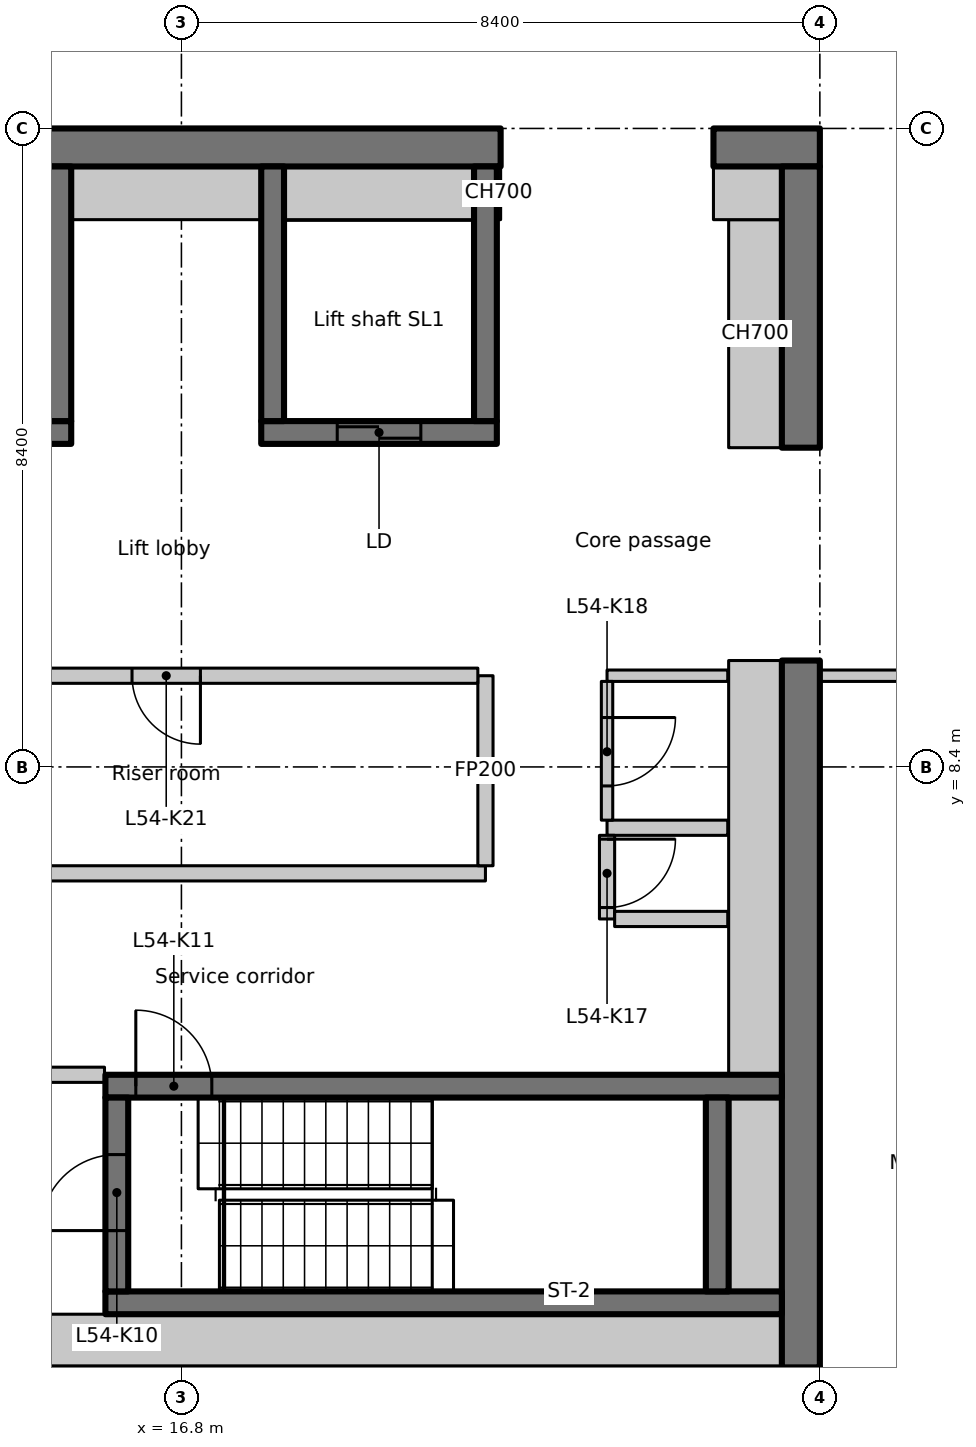
"""IFC4 building model, lengths in metres.
Left out: names, types, materials, properties, quantities, classifications, styles, units other than length and angle.
Written with IfcOpenShell. Run it as: python <this file> out.ifc"""

import sys

from ifc_helpers import new_model, si_unit, direction, frame, frame_2d, origin, place, context, subcontext, project, spatial, rectangle, extrude, element, fill, save


model = new_model("IFC4")
c1 = context("Model", 3, precision=1e-05, world=origin(), true_north=direction((0.0, 1.0)))
c2 = subcontext(c1, "Body", "Model", "MODEL_VIEW")
j1 = project(units=[si_unit("LENGTHUNIT", "METRE"), si_unit("PLANEANGLEUNIT", "RADIAN")], contexts=[c1])
p1 = place(None, origin())
s1 = spatial("IfcSite", under=j1, at=p1, CompositionType="ELEMENT")
p2 = place(p1, origin())
s2 = spatial("IfcBuilding", under=s1, at=p2, CompositionType="ELEMENT")
p3 = place(p2, frame((0.0, 0.0, 215.7)))
s3 = spatial("IfcBuildingStorey", under=s2, at=p3, CompositionType="ELEMENT", Elevation=215.7)
p4 = place(p3, frame((-1.1, 16.55, 0.0), z_axis=(0.0, 0.0, 1.0), x_axis=(1.0, 0.0, 0.0)))
e1 = element("IfcWall", 1, at=p4, inside=s3, PredefinedType="SHEAR", context=c2, shape_type="SweptSolid", body=[
    extrude(rectangle(XDim=22.1, YDim=0.5, at=frame_2d((11.05, 0.0))), origin(), (0.0, 0.0, 1.0), 3.35),
])
p5 = place(p4, frame((3.15, 0.0, 0.0)))
e2 = element("IfcOpeningElement", 2, at=p5, cuts=e1, PredefinedType="OPENING", context=c2, shape_type="SweptSolid", body=[
    extrude(rectangle(XDim=1.1, YDim=2.3, at=frame_2d((0.55, 1.15))), frame((0.0, 0.26, 0.0), z_axis=(0.0, -1.0, 0.0), x_axis=(1.0, 0.0, 0.0)), (0.0, 0.0, 1.0), 0.52),
])
p6 = place(p3, frame((23.8, 16.55, 0.0), z_axis=(0.0, 0.0, 1.0), x_axis=(1.0, 0.0, 0.0)))
e3 = element("IfcWall", 3, at=p6, inside=s3, PredefinedType="SHEAR", context=c2, shape_type="SweptSolid", body=[
    extrude(rectangle(XDim=1.4, YDim=0.5, at=frame_2d((0.7, 0.0))), origin(), (0.0, 0.0, 1.0), 3.35),
])
p7 = place(p3, frame((24.95, 0.5, 0.0), z_axis=(0.0, 0.0, 1.0), x_axis=(0.0, 1.0, 0.0)))
e4 = element("IfcWall", 4, at=p7, inside=s3, PredefinedType="SHEAR", context=c2, shape_type="SweptSolid", body=[
    extrude(rectangle(XDim=9.3, YDim=0.5, at=frame_2d((4.65, 0.0))), origin(), (0.0, 0.0, 1.0), 3.35),
])
p8 = place(p3, frame((24.95, 12.6, 0.0), z_axis=(0.0, 0.0, 1.0), x_axis=(0.0, 1.0, 0.0)))
e5 = element("IfcWall", 5, at=p8, inside=s3, PredefinedType="SHEAR", context=c2, shape_type="SweptSolid", body=[
    extrude(rectangle(XDim=3.7, YDim=0.5, at=frame_2d((1.85, 0.0))), origin(), (0.0, 0.0, 1.0), 3.35),
])
p9 = place(p3, frame((24.35, 12.6, 0.0), z_axis=(0.0, 0.0, 1.0), x_axis=(0.0, 1.0, 0.0)))
e6 = element("IfcWall", 6, at=p9, inside=s3, PredefinedType="PARTITIONING", context=c2, shape_type="SweptSolid", body=[
    extrude(rectangle(XDim=3.0, YDim=0.7, at=frame_2d((1.5, 0.0))), origin(), (0.0, 0.0, 1.0), 3.35),
])
p10 = place(p3, frame((23.8, 15.95, 0.0), z_axis=(0.0, 0.0, 1.0), x_axis=(1.0, 0.0, 0.0)))
e7 = element("IfcWall", 7, at=p10, inside=s3, PredefinedType="PARTITIONING", context=c2, shape_type="SweptSolid", body=[
    extrude(rectangle(XDim=0.9, YDim=0.7, at=frame_2d((0.45, 0.0))), origin(), (0.0, 0.0, 1.0), 3.35),
])
p11 = place(p3, frame((0.5, 12.8, 0.0), z_axis=(0.0, 0.0, 1.0), x_axis=(1.0, 0.0, 0.0)))
e8 = element("IfcWall", 8, at=p11, inside=s3, PredefinedType="SHEAR", context=c2, shape_type="SweptSolid", body=[
    extrude(rectangle(XDim=14.85, YDim=0.3, at=frame_2d((7.425, 0.0))), origin(), (0.0, 0.0, 1.0), 3.35),
])
p12 = place(p11, frame((4.35, 0.0, 0.0)))
e9 = element("IfcOpeningElement", 9, at=p12, cuts=e8, PredefinedType="OPENING", context=c2, shape_type="SweptSolid", body=[
    extrude(rectangle(XDim=1.1, YDim=2.3, at=frame_2d((0.55, 1.15))), frame((0.0, 0.16, 0.0), z_axis=(0.0, -1.0, 0.0), x_axis=(1.0, 0.0, 0.0)), (0.0, 0.0, 1.0), 0.32),
])
p13 = place(p11, frame((7.15, 0.0, 0.0)))
e10 = element("IfcOpeningElement", 10, at=p13, cuts=e8, PredefinedType="OPENING", context=c2, shape_type="SweptSolid", body=[
    extrude(rectangle(XDim=1.1, YDim=2.3, at=frame_2d((0.55, 1.15))), frame((0.0, 0.16, 0.0), z_axis=(0.0, -1.0, 0.0), x_axis=(1.0, 0.0, 0.0)), (0.0, 0.0, 1.0), 0.32),
])
p14 = place(p11, frame((9.95, 0.0, 0.0)))
e11 = element("IfcOpeningElement", 11, at=p14, cuts=e8, PredefinedType="OPENING", context=c2, shape_type="SweptSolid", body=[
    extrude(rectangle(XDim=1.1, YDim=2.3, at=frame_2d((0.55, 1.15))), frame((0.0, 0.16, 0.0), z_axis=(0.0, -1.0, 0.0), x_axis=(1.0, 0.0, 0.0)), (0.0, 0.0, 1.0), 0.32),
])
p15 = place(p11, frame((12.75, 0.0, 0.0)))
e12 = element("IfcOpeningElement", 12, at=p15, cuts=e8, PredefinedType="OPENING", context=c2, shape_type="SweptSolid", body=[
    extrude(rectangle(XDim=1.1, YDim=2.3, at=frame_2d((0.55, 1.15))), frame((0.0, 0.16, 0.0), z_axis=(0.0, -1.0, 0.0), x_axis=(1.0, 0.0, 0.0)), (0.0, 0.0, 1.0), 0.32),
])
p16 = place(p3, frame((15.2, 12.95, 0.0), z_axis=(0.0, 0.0, 1.0), x_axis=(0.0, 1.0, 0.0)))
e13 = element("IfcWall", 13, at=p16, inside=s3, PredefinedType="SHEAR", context=c2, shape_type="SweptSolid", body=[
    extrude(rectangle(XDim=3.35, YDim=0.3, at=frame_2d((1.675, 0.0))), origin(), (0.0, 0.0, 1.0), 3.35),
])
p17 = place(p3, frame((17.85, 12.8, 0.0), z_axis=(0.0, 0.0, 1.0), x_axis=(1.0, 0.0, 0.0)))
e14 = element("IfcWall", 14, at=p17, inside=s3, PredefinedType="SHEAR", context=c2, shape_type="SweptSolid", body=[
    extrude(rectangle(XDim=3.1, YDim=0.3, at=frame_2d((1.55, 0.0))), origin(), (0.0, 0.0, 1.0), 3.35),
])
p18 = place(p17, frame((1.0, 0.0, 0.0)))
e15 = element("IfcOpeningElement", 15, at=p18, cuts=e14, PredefinedType="OPENING", context=c2, shape_type="SweptSolid", body=[
    extrude(rectangle(XDim=1.1, YDim=2.3, at=frame_2d((0.55, 1.15))), frame((0.0, 0.16, 0.0), z_axis=(0.0, -1.0, 0.0), x_axis=(1.0, 0.0, 0.0)), (0.0, 0.0, 1.0), 0.32),
])
for number, where, z_axis, x_axis in (
    (16, (18.0, 12.95, 0.0), (0.0, 0.0, 1.0), (0.0, 1.0, 0.0)),
    (17, (20.8, 12.95, 0.0), (0.0, 0.0, 1.0), (0.0, 1.0, 0.0)),
):
    element("IfcWall", number, at=place(p3, frame(where, z_axis=z_axis, x_axis=x_axis)), inside=s3, PredefinedType="SHEAR", context=c2, shape_type="SweptSolid", body=[
        extrude(rectangle(XDim=3.35, YDim=0.3, at=frame_2d((1.675, 0.0))), origin(), (0.0, 0.0, 1.0), 3.35),
    ])
p19 = place(p3, frame((15.8, 1.35, 0.0), z_axis=(0.0, 0.0, 1.0), x_axis=(1.0, 0.0, 0.0)))
e18 = element("IfcWall", 18, at=p19, inside=s3, PredefinedType="SHEAR", context=c2, shape_type="SweptSolid", body=[
    extrude(rectangle(XDim=8.9, YDim=0.3, at=frame_2d((4.45, 0.0))), origin(), (0.0, 0.0, 1.0), 3.35),
])
p20 = place(p3, frame((15.8, 4.2, 0.0), z_axis=(0.0, 0.0, 1.0), x_axis=(1.0, 0.0, 0.0)))
e19 = element("IfcWall", 19, at=p20, inside=s3, PredefinedType="SHEAR", context=c2, shape_type="SweptSolid", body=[
    extrude(rectangle(XDim=8.9, YDim=0.3, at=frame_2d((4.45, 0.0))), origin(), (0.0, 0.0, 1.0), 3.35),
])
p21 = place(p20, frame((0.4, 0.0, 0.0)))
e20 = element("IfcOpeningElement", 20, at=p21, cuts=e19, PredefinedType="OPENING", context=c2, shape_type="SweptSolid", body=[
    extrude(rectangle(XDim=1.0, YDim=2.1, at=frame_2d((0.5, 1.05))), frame((0.0, 0.16, 0.0), z_axis=(0.0, -1.0, 0.0), x_axis=(1.0, 0.0, 0.0)), (0.0, 0.0, 1.0), 0.32),
])
p22 = place(p3, frame((15.95, 1.5, 0.0), z_axis=(0.0, 0.0, 1.0), x_axis=(0.0, 1.0, 0.0)))
e21 = element("IfcWall", 21, at=p22, inside=s3, PredefinedType="SHEAR", context=c2, shape_type="SweptSolid", body=[
    extrude(rectangle(XDim=2.55, YDim=0.3, at=frame_2d((1.275, 0.0))), origin(), (0.0, 0.0, 1.0), 3.35),
])
p23 = place(p22, frame((0.8, 0.0, 0.0)))
e22 = element("IfcOpeningElement", 22, at=p23, cuts=e21, PredefinedType="OPENING", context=c2, shape_type="SweptSolid", body=[
    extrude(rectangle(XDim=1.0, YDim=2.1, at=frame_2d((0.5, 1.05))), frame((0.0, 0.16, 0.0), z_axis=(0.0, -1.0, 0.0), x_axis=(1.0, 0.0, 0.0)), (0.0, 0.0, 1.0), 0.32),
])
p24 = place(p3, frame((23.85, 1.5, 0.0), z_axis=(0.0, 0.0, 1.0), x_axis=(0.0, 1.0, 0.0)))
e23 = element("IfcWall", 23, at=p24, inside=s3, PredefinedType="SHEAR", context=c2, shape_type="SweptSolid", body=[
    extrude(rectangle(XDim=2.55, YDim=0.3, at=frame_2d((1.275, 0.0))), origin(), (0.0, 0.0, 1.0), 3.35),
])
p25 = place(p3, frame((13.362, 4.35, 0.0), z_axis=(0.0, 0.0, 1.0), x_axis=(1.0, 0.0, 0.0)))
e24 = element("IfcWall", 24, at=p25, inside=s3, PredefinedType="PARTITIONING", context=c2, shape_type="SweptSolid", body=[
    extrude(rectangle(XDim=2.426, YDim=0.2, at=frame_2d((1.213, 0.0))), origin(), (0.0, 0.0, 1.0), 3.35),
])
p26 = place(p25, frame((0.638, 0.0, 0.0)))
e25 = element("IfcOpeningElement", 25, at=p26, cuts=e24, PredefinedType="OPENING", context=c2, shape_type="SweptSolid", body=[
    extrude(rectangle(XDim=1.0, YDim=2.1, at=frame_2d((0.5, 1.05))), frame((0.0, 0.11, 0.0), z_axis=(0.0, -1.0, 0.0), x_axis=(1.0, 0.0, 0.0)), (0.0, 0.0, 1.0), 0.22),
])
p27 = place(p3, frame((12.4, 7.0, 0.0), z_axis=(0.0, 0.0, 1.0), x_axis=(1.0, 0.0, 0.0)))
e26 = element("IfcWall", 26, at=p27, inside=s3, PredefinedType="PARTITIONING", context=c2, shape_type="SweptSolid", body=[
    extrude(rectangle(XDim=8.4, YDim=0.2, at=frame_2d((4.2, 0.0))), origin(), (0.0, 0.0, 1.0), 3.35),
])
p28 = place(p3, frame((20.8, 7.1, 0.0), z_axis=(0.0, 0.0, 1.0), x_axis=(0.0, 1.0, 0.0)))
e27 = element("IfcWall", 27, at=p28, inside=s3, PredefinedType="PARTITIONING", context=c2, shape_type="SweptSolid", body=[
    extrude(rectangle(XDim=2.5, YDim=0.2, at=frame_2d((1.25, 0.0))), origin(), (0.0, 0.0, 1.0), 3.35),
])
p29 = place(p3, frame((20.7, 9.6, 0.0), z_axis=(0.0, 0.0, 1.0), x_axis=(-1.0, 0.0, 0.0)))
e28 = element("IfcWall", 28, at=p29, inside=s3, PredefinedType="PARTITIONING", context=c2, shape_type="SweptSolid", body=[
    extrude(rectangle(XDim=8.3, YDim=0.2, at=frame_2d((4.15, 0.0))), origin(), (0.0, 0.0, 1.0), 3.35),
])
p30 = place(p29, frame((3.65, 0.0, 0.0)))
e29 = element("IfcOpeningElement", 29, at=p30, cuts=e28, PredefinedType="OPENING", context=c2, shape_type="SweptSolid", body=[
    extrude(rectangle(XDim=0.9, YDim=2.1, at=frame_2d((0.45, 1.05))), frame((0.0, 0.11, 0.0), z_axis=(0.0, -1.0, 0.0), x_axis=(1.0, 0.0, 0.0)), (0.0, 0.0, 1.0), 0.22),
])
p31 = place(p3, frame((23.988, 7.6, 0.0), z_axis=(0.0, 0.0, 1.0), x_axis=(-1.0, 0.0, 0.0)))
e30 = element("IfcWall", 30, at=p31, inside=s3, PredefinedType="PARTITIONING", context=c2, shape_type="SweptSolid", body=[
    extrude(rectangle(XDim=1.588, YDim=0.2, at=frame_2d((0.794, 0.0))), origin(), (0.0, 0.0, 1.0), 3.35),
])
p32 = place(p3, frame((22.4, 7.5, 0.0), z_axis=(0.0, 0.0, 1.0), x_axis=(0.0, -1.0, 0.0)))
e31 = element("IfcWall", 31, at=p32, inside=s3, PredefinedType="PARTITIONING", context=c2, shape_type="SweptSolid", body=[
    extrude(rectangle(XDim=1.1, YDim=0.2, at=frame_2d((0.55, 0.0))), origin(), (0.0, 0.0, 1.0), 3.35),
])
p33 = place(p32, frame((0.05, 0.0, 0.0)))
e32 = element("IfcOpeningElement", 32, at=p33, cuts=e31, PredefinedType="OPENING", context=c2, shape_type="SweptSolid", body=[
    extrude(rectangle(XDim=0.9, YDim=2.1, at=frame_2d((0.45, 1.05))), frame((0.0, 0.11, 0.0), z_axis=(0.0, -1.0, 0.0), x_axis=(1.0, 0.0, 0.0)), (0.0, 0.0, 1.0), 0.22),
])
p34 = place(p3, frame((22.5, 6.4, 0.0), z_axis=(0.0, 0.0, 1.0), x_axis=(1.0, 0.0, 0.0)))
e33 = element("IfcWall", 33, at=p34, inside=s3, PredefinedType="PARTITIONING", context=c2, shape_type="SweptSolid", body=[
    extrude(rectangle(XDim=1.488, YDim=0.2, at=frame_2d((0.744, 0.0))), origin(), (0.0, 0.0, 1.0), 3.35),
])
p35 = place(p3, frame((23.988, 9.6, 0.0), z_axis=(0.0, 0.0, 1.0), x_axis=(-1.0, 0.0, 0.0)))
e34 = element("IfcWall", 34, at=p35, inside=s3, PredefinedType="PARTITIONING", context=c2, shape_type="SweptSolid", body=[
    extrude(rectangle(XDim=1.588, YDim=0.15, at=frame_2d((0.794, 0.0))), origin(), (0.0, 0.0, 1.0), 3.35),
])
p36 = place(p3, frame((22.4, 9.525, 0.0), z_axis=(0.0, 0.0, 1.0), x_axis=(0.0, -1.0, 0.0)))
e35 = element("IfcWall", 35, at=p36, inside=s3, PredefinedType="PARTITIONING", context=c2, shape_type="SweptSolid", body=[
    extrude(rectangle(XDim=1.825, YDim=0.15, at=frame_2d((0.913, 0.0))), origin(), (0.0, 0.0, 1.0), 3.35),
])
p37 = place(p36, frame((0.475, 0.0, 0.0)))
e36 = element("IfcOpeningElement", 36, at=p37, cuts=e35, PredefinedType="OPENING", context=c2, shape_type="SweptSolid", body=[
    extrude(rectangle(XDim=0.9, YDim=2.1, at=frame_2d((0.45, 1.05))), frame((0.0, 0.085, 0.0), z_axis=(0.0, -1.0, 0.0), x_axis=(1.0, 0.0, 0.0)), (0.0, 0.0, 1.0), 0.17),
])
for number, where, z_axis, x_axis in (
    (37, (15.35, 15.95, 0.0), (0.0, 0.0, 1.0), (1.0, 0.0, 0.0)),
    (38, (18.15, 15.95, 0.0), (0.0, 0.0, 1.0), (1.0, 0.0, 0.0)),
):
    element("IfcWall", number, at=place(p3, frame(where, z_axis=z_axis, x_axis=x_axis)), inside=s3, PredefinedType="PARTITIONING", context=c2, shape_type="SweptSolid", body=[
        extrude(rectangle(XDim=2.5, YDim=0.7, at=frame_2d((1.25, 0.0))), origin(), (0.0, 0.0, 1.0), 3.35),
    ])
p38 = place(p3, frame((20.95, 15.95, 0.0), z_axis=(0.0, 0.0, 1.0), x_axis=(1.0, 0.0, 0.0)))
e39 = element("IfcWall", 39, at=p38, inside=s3, PredefinedType="PARTITIONING", context=c2, shape_type="SweptSolid", body=[
    extrude(rectangle(XDim=0.05, YDim=0.7, at=frame_2d((0.025, 0.0))), origin(), (0.0, 0.0, 1.0), 3.35),
])
p39 = place(p3, frame((13.35, 0.85, 0.0), z_axis=(0.0, 0.0, 1.0), x_axis=(1.0, 0.0, 0.0)))
e40 = element("IfcWall", 40, at=p39, inside=s3, PredefinedType="PARTITIONING", context=c2, shape_type="SweptSolid", body=[
    extrude(rectangle(XDim=11.35, YDim=0.7, at=frame_2d((5.675, 0.0))), origin(), (0.0, 0.0, 1.0), 3.35),
])
p40 = place(p3, frame((24.35, 1.5, 0.0), z_axis=(0.0, 0.0, 1.0), x_axis=(0.0, 1.0, 0.0)))
e41 = element("IfcWall", 41, at=p40, inside=s3, PredefinedType="PARTITIONING", context=c2, shape_type="SweptSolid", body=[
    extrude(rectangle(XDim=2.55, YDim=0.7, at=frame_2d((1.275, 0.0))), origin(), (0.0, 0.0, 1.0), 3.35),
])
p41 = place(p3, frame((24.35, 4.35, 0.0), z_axis=(0.0, 0.0, 1.0), x_axis=(0.0, 1.0, 0.0)))
e42 = element("IfcWall", 42, at=p41, inside=s3, PredefinedType="PARTITIONING", context=c2, shape_type="SweptSolid", body=[
    extrude(rectangle(XDim=5.45, YDim=0.7, at=frame_2d((2.725, 0.0))), origin(), (0.0, 0.0, 1.0), 3.35),
])
p42 = place(p3, frame((29.4, 9.6, 0.0), z_axis=(0.0, 0.0, 1.0), x_axis=(-1.0, 0.0, 0.0)))
e43 = element("IfcWall", 43, at=p42, inside=s3, PredefinedType="PARTITIONING", context=c2, shape_type="SweptSolid", body=[
    extrude(rectangle(XDim=4.2, YDim=0.15, at=frame_2d((2.1, 0.0))), origin(), (0.0, 0.0, 1.0), 3.33),
])
p43 = place(p42, frame((1.2, 0.0, 0.0)))
e44 = element("IfcOpeningElement", 44, at=p43, cuts=e43, PredefinedType="OPENING", context=c2, shape_type="SweptSolid", body=[
    extrude(rectangle(XDim=1.6, YDim=2.1, at=frame_2d((0.8, 1.05))), frame((0.0, 0.085, 0.0), z_axis=(0.0, -1.0, 0.0), x_axis=(1.0, 0.0, 0.0)), (0.0, 0.0, 1.0), 0.17),
])
p44 = place(p18, origin())
e45 = element("IfcDoor", 45, at=p44, inside=s3, OperationType="SLIDING_TO_LEFT", PredefinedType="DOOR", context=c2, shape_type="SweptSolid", body=[
    extrude(rectangle(XDim=1.1, YDim=2.3, at=frame_2d((0.55, 1.15))), frame((0.0, 0.025, 0.0), z_axis=(0.0, -1.0, 0.0), x_axis=(1.0, 0.0, 0.0)), (0.0, 0.0, 1.0), 0.05),
])
fill(e15, e45)
p45 = place(p23, origin())
e46 = element("IfcDoor", 46, at=p45, inside=s3, OperationType="SINGLE_SWING_LEFT", PredefinedType="DOOR", context=c2, shape_type="SweptSolid", body=[
    extrude(rectangle(XDim=1.0, YDim=2.1, at=frame_2d((0.5, 1.05))), frame((0.0, 0.025, 0.0), z_axis=(0.0, -1.0, 0.0), x_axis=(1.0, 0.0, 0.0)), (0.0, 0.0, 1.0), 0.05),
])
fill(e22, e46)
p46 = place(p21, origin())
e47 = element("IfcDoor", 47, at=p46, inside=s3, OperationType="SINGLE_SWING_RIGHT", PredefinedType="DOOR", context=c2, shape_type="SweptSolid", body=[
    extrude(rectangle(XDim=1.0, YDim=2.1, at=frame_2d((0.5, 1.05))), frame((0.0, 0.025, 0.0), z_axis=(0.0, -1.0, 0.0), x_axis=(1.0, 0.0, 0.0)), (0.0, 0.0, 1.0), 0.05),
])
fill(e20, e47)
p47 = place(p33, origin())
e48 = element("IfcDoor", 48, at=p47, inside=s3, OperationType="SINGLE_SWING_RIGHT", PredefinedType="DOOR", context=c2, shape_type="SweptSolid", body=[
    extrude(rectangle(XDim=0.9, YDim=2.1, at=frame_2d((0.45, 1.05))), frame((0.0, 0.025, 0.0), z_axis=(0.0, -1.0, 0.0), x_axis=(1.0, 0.0, 0.0)), (0.0, 0.0, 1.0), 0.05),
])
fill(e32, e48)
p48 = place(p37, origin())
e49 = element("IfcDoor", 49, at=p48, inside=s3, OperationType="SINGLE_SWING_LEFT", PredefinedType="DOOR", context=c2, shape_type="SweptSolid", body=[
    extrude(rectangle(XDim=0.9, YDim=2.1, at=frame_2d((0.45, 1.05))), frame((0.0, 0.025, 0.0), z_axis=(0.0, -1.0, 0.0), x_axis=(1.0, 0.0, 0.0)), (0.0, 0.0, 1.0), 0.05),
])
fill(e36, e49)
p49 = place(p30, origin())
e50 = element("IfcDoor", 50, at=p49, inside=s3, OperationType="SINGLE_SWING_RIGHT", PredefinedType="DOOR", context=c2, shape_type="SweptSolid", body=[
    extrude(rectangle(XDim=0.9, YDim=2.1, at=frame_2d((0.45, 1.05))), frame((0.0, 0.025, 0.0), z_axis=(0.0, -1.0, 0.0), x_axis=(1.0, 0.0, 0.0)), (0.0, 0.0, 1.0), 0.05),
])
fill(e29, e50)
save(model, sys.argv[1])
